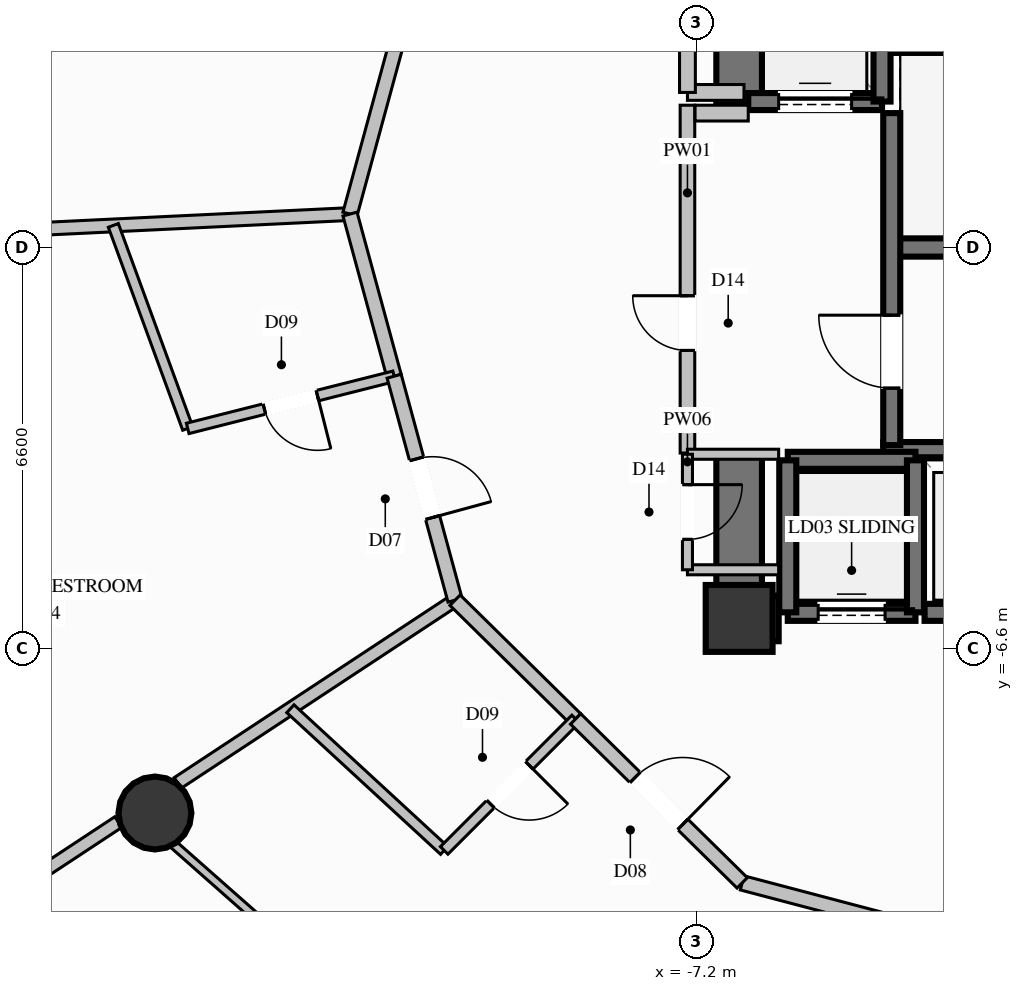
"""IFC4 building model, lengths in metres.
Left out: names, types, materials, properties, quantities, classifications, styles, units other than length and angle.
Written with IfcOpenShell. Run it as: python <this file> out.ifc"""

import sys

from ifc_helpers import new_model, si_unit, direction, frame, frame_2d, origin, origin_2d, place, context, subcontext, project, spatial, rectangle, circle, extrude, element, fill, save


model = new_model("IFC4")
c1 = context("Model", 3, precision=1e-05, world=origin(), true_north=direction((0.0, 1.0)))
c2 = subcontext(c1, "Body", "Model", "MODEL_VIEW")
j1 = project(units=[si_unit("LENGTHUNIT", "METRE"), si_unit("PLANEANGLEUNIT", "RADIAN")], contexts=[c1])
p1 = place(None, origin())
s1 = spatial("IfcSite", under=j1, at=p1, CompositionType="ELEMENT")
p2 = place(p1, origin())
s2 = spatial("IfcBuilding", under=s1, at=p2, CompositionType="ELEMENT")
p3 = place(p2, frame((0.0, 0.0, 89.6)))
s3 = spatial("IfcBuildingStorey", under=s2, at=p3, CompositionType="ELEMENT", Elevation=89.6)
p4 = place(p3, frame((-6.5, -6.1, 0.0), z_axis=(0.0, 0.0, 1.0), x_axis=(1.0, 0.0, 0.0)))
e1 = element("IfcColumn", 1, at=p4, inside=s3, PredefinedType="COLUMN", context=c2, shape_type="SweptSolid", body=[
    extrude(rectangle(XDim=1.1, YDim=1.1, at=origin_2d()), origin(), (0.0, 0.0, 1.0), 3.6),
])
p5 = place(p3, frame((-3.99, 0.0, 0.0), z_axis=(0.0, 0.0, 1.0), x_axis=(1.0, 0.0, 0.0)))
e2 = element("IfcWall", 2, at=p5, inside=s3, PredefinedType="SHEAR", context=c2, shape_type="SweptSolid", body=[
    extrude(rectangle(XDim=7.98, YDim=0.3, at=frame_2d((3.99, 0.0))), origin(), (0.0, 0.0, 1.0), 3.6),
])
for number, where, z_axis, x_axis in (
    (3, (-4.13, -3.325, 0.0), (0.0, 0.0, 1.0), (1.0, 0.0, 0.0)),
    (4, (-4.13, 3.325, 0.0), (0.0, 0.0, 1.0), (1.0, 0.0, 0.0)),
):
    element("IfcWall", number, at=place(p3, frame(where, z_axis=z_axis, x_axis=x_axis)), inside=s3, PredefinedType="SOLIDWALL", context=c2, shape_type="SweptSolid", body=[
        extrude(rectangle(XDim=8.26, YDim=0.25, at=frame_2d((4.13, 0.0))), origin(), (0.0, 0.0, 1.0), 3.6),
    ])
p6 = place(p3, frame((-6.125, -6.1, 0.0), z_axis=(0.0, 0.0, 1.0), x_axis=(1.0, 0.0, 0.0)))
e5 = element("IfcWall", 5, at=p6, inside=s3, PredefinedType="SHEAR", context=c2, shape_type="SweptSolid", body=[
    extrude(rectangle(XDim=0.275, YDim=0.75, at=frame_2d((0.137, 0.0))), origin(), (0.0, 0.0, 1.0), 3.6),
])
p7 = place(p3, frame((-6.5, 2.35, 0.0), z_axis=(0.0, 0.0, 1.0), x_axis=(0.0, 1.0, 0.0)))
e6 = element("IfcWall", 6, at=p7, inside=s3, PredefinedType="SHEAR", context=c2, shape_type="SweptSolid", body=[
    extrude(rectangle(XDim=4.125, YDim=0.75, at=frame_2d((2.062, 0.0))), origin(), (0.0, 0.0, 1.0), 3.6),
])
p8 = place(p3, frame((-6.5, -6.475, 0.0), z_axis=(0.0, 0.0, 1.0), x_axis=(0.0, 1.0, 0.0)))
e7 = element("IfcWall", 7, at=p8, inside=s3, PredefinedType="SHEAR", context=c2, shape_type="SweptSolid", body=[
    extrude(rectangle(XDim=3.125, YDim=0.75, at=frame_2d((1.562, 0.0))), origin(), (0.0, 0.0, 1.0), 3.6),
])
p9 = place(p3, frame((-16.108, -9.3, 0.0), z_axis=(0.0, 0.0, 1.0), x_axis=(1.0, 0.0, 0.0)))
e8 = element("IfcColumn", 8, at=p9, inside=s3, PredefinedType="COLUMN", context=c2, shape_type="SweptSolid", body=[
    extrude(circle(Radius=0.6, at=origin_2d()), origin(), (0.0, 0.0, 1.0), 3.6),
])
p10 = place(p3, frame((-15.415, -15.264, 0.0), z_axis=(0.0, 0.0, 1.0), x_axis=(-0.667278098427, 0.744808659563, 0.0)))
e9 = element("IfcWall", 9, at=p10, inside=s3, PredefinedType="SOLIDWALL", context=c2, shape_type="SweptSolid", body=[
    extrude(rectangle(XDim=8.149, YDim=0.32, at=frame_2d((4.075, 0.0))), origin(), (0.0, 0.0, 1.0), 3.2),
])
p11 = place(p10, frame((1.862, 0.0, 0.35)))
e10 = element("IfcOpeningElement", 10, at=p11, cuts=e9, PredefinedType="OPENING", context=c2, shape_type="SweptSolid", body=[
    extrude(rectangle(XDim=1.8, YDim=2.6, at=frame_2d((0.9, 1.3))), frame((0.0, 0.17, 0.0), z_axis=(0.0, -1.0, 0.0), x_axis=(1.0, 0.0, 0.0)), (0.0, 0.0, 1.0), 0.34),
])
p12 = place(p3, frame((-5.7, -6.0, 0.0), z_axis=(0.0, 0.0, 1.0), x_axis=(1.0, 0.0, 0.0)))
e11 = element("IfcWall", 11, at=p12, inside=s3, PredefinedType="SOLIDWALL", context=c2, shape_type="SweptSolid", body=[
    extrude(rectangle(XDim=2.1, YDim=0.28, at=frame_2d((1.05, 0.0))), origin(), (0.0, 0.0, 1.0), 3.2),
])
p13 = place(p12, frame((0.5, 0.0, 0.0)))
e12 = element("IfcOpeningElement", 12, at=p13, cuts=e11, PredefinedType="OPENING", context=c2, shape_type="SweptSolid", body=[
    extrude(rectangle(XDim=1.1, YDim=2.02, at=frame_2d((0.55, 1.01))), frame((0.0, 0.15, 0.0), z_axis=(0.0, -1.0, 0.0), x_axis=(1.0, 0.0, 0.0)), (0.0, 0.0, 1.0), 0.3),
])
p14 = place(p3, frame((-3.6, -3.5, 0.0), z_axis=(0.0, 0.0, 1.0), x_axis=(-1.0, 0.0, 0.0)))
e13 = element("IfcWall", 13, at=p14, inside=s3, PredefinedType="SOLIDWALL", context=c2, shape_type="SweptSolid", body=[
    extrude(rectangle(XDim=2.1, YDim=0.28, at=frame_2d((1.05, 0.0))), origin(), (0.0, 0.0, 1.0), 3.2),
])
for number, where, z_axis, x_axis in (
    (14, (-5.7, -3.5, 0.0), (0.0, 0.0, 1.0), (0.0, -1.0, 0.0)),
    (15, (-3.6, -6.0, 0.0), (0.0, 0.0, 1.0), (0.0, 1.0, 0.0)),
):
    element("IfcWall", number, at=place(p3, frame(where, z_axis=z_axis, x_axis=x_axis)), inside=s3, PredefinedType="SOLIDWALL", context=c2, shape_type="SweptSolid", body=[
        extrude(rectangle(XDim=2.5, YDim=0.28, at=frame_2d((1.25, 0.0))), origin(), (0.0, 0.0, 1.0), 3.2),
    ])
p15 = place(p3, frame((-3.45, -6.0, 0.0), z_axis=(0.0, 0.0, 1.0), x_axis=(1.0, 0.0, 0.0)))
e16 = element("IfcWall", 16, at=p15, inside=s3, PredefinedType="SOLIDWALL", context=c2, shape_type="SweptSolid", body=[
    extrude(rectangle(XDim=2.1, YDim=0.28, at=frame_2d((1.05, 0.0))), origin(), (0.0, 0.0, 1.0), 3.2),
])
p16 = place(p15, frame((0.5, 0.0, 0.0)))
e17 = element("IfcOpeningElement", 17, at=p16, cuts=e16, PredefinedType="OPENING", context=c2, shape_type="SweptSolid", body=[
    extrude(rectangle(XDim=1.1, YDim=2.02, at=frame_2d((0.55, 1.01))), frame((0.0, 0.15, 0.0), z_axis=(0.0, -1.0, 0.0), x_axis=(1.0, 0.0, 0.0)), (0.0, 0.0, 1.0), 0.3),
])
p17 = place(p3, frame((-6.35, 2.4, 0.0), z_axis=(0.0, 0.0, 1.0), x_axis=(1.0, 0.0, 0.0)))
e18 = element("IfcWall", 18, at=p17, inside=s3, PredefinedType="SOLIDWALL", context=c2, shape_type="SweptSolid", body=[
    extrude(rectangle(XDim=2.2, YDim=0.28, at=frame_2d((1.1, 0.0))), origin(), (0.0, 0.0, 1.0), 3.2),
])
p18 = place(p17, frame((0.5, 0.0, 0.0)))
e19 = element("IfcOpeningElement", 19, at=p18, cuts=e18, PredefinedType="OPENING", context=c2, shape_type="SweptSolid", body=[
    extrude(rectangle(XDim=1.2, YDim=2.2, at=frame_2d((0.6, 1.1))), frame((0.0, 0.15, 0.0), z_axis=(0.0, -1.0, 0.0), x_axis=(1.0, 0.0, 0.0)), (0.0, 0.0, 1.0), 0.3),
])
p19 = place(p3, frame((-4.15, 2.4, 0.0), z_axis=(0.0, 0.0, 1.0), x_axis=(0.0, 1.0, 0.0)))
e20 = element("IfcWall", 20, at=p19, inside=s3, PredefinedType="SOLIDWALL", context=c2, shape_type="SweptSolid", body=[
    extrude(rectangle(XDim=2.7, YDim=0.28, at=frame_2d((1.35, 0.0))), origin(), (0.0, 0.0, 1.0), 3.2),
])
p20 = place(p3, frame((-3.99, -3.25, 0.0), z_axis=(0.0, 0.0, 1.0), x_axis=(0.0, 1.0, 0.0)))
e21 = element("IfcWall", 21, at=p20, inside=s3, PredefinedType="SOLIDWALL", context=c2, shape_type="SweptSolid", body=[
    extrude(rectangle(XDim=5.46, YDim=0.28, at=frame_2d((2.73, 0.0))), origin(), (0.0, 0.0, 1.0), 3.2),
])
p21 = place(p20, frame((0.937, 0.0, 0.0)))
e22 = element("IfcOpeningElement", 22, at=p21, cuts=e21, PredefinedType="OPENING", context=c2, shape_type="SweptSolid", body=[
    extrude(rectangle(XDim=1.2, YDim=2.2, at=frame_2d((0.6, 1.1))), frame((0.0, 0.15, 0.0), z_axis=(0.0, -1.0, 0.0), x_axis=(1.0, 0.0, 0.0)), (0.0, 0.0, 1.0), 0.3),
])
p22 = place(p3, frame((-7.35, -3.38, 0.0), z_axis=(0.0, 0.0, 1.0), x_axis=(0.0, 1.0, 0.0)))
e23 = element("IfcWall", 23, at=p22, inside=s3, PredefinedType="PARTITIONING", context=c2, shape_type="SweptSolid", body=[
    extrude(rectangle(XDim=5.72, YDim=0.24, at=frame_2d((2.86, 0.0))), origin(), (0.0, 0.0, 1.0), 3.2),
])
p23 = place(p22, frame((1.687, 0.0, 0.0)))
e24 = element("IfcOpeningElement", 24, at=p23, cuts=e23, PredefinedType="OPENING", context=c2, shape_type="SweptSolid", body=[
    extrude(rectangle(XDim=0.9, YDim=2.02, at=frame_2d((0.45, 1.01))), frame((0.0, 0.13, 0.0), z_axis=(0.0, -1.0, 0.0), x_axis=(1.0, 0.0, 0.0)), (0.0, 0.0, 1.0), 0.26),
])
p24 = place(p3, frame((-7.225, 2.21, 0.0), z_axis=(0.0, 0.0, 1.0), x_axis=(1.0, 0.0, 0.0)))
e25 = element("IfcWall", 25, at=p24, inside=s3, PredefinedType="PARTITIONING", context=c2, shape_type="SweptSolid", body=[
    extrude(rectangle(XDim=0.875, YDim=0.26, at=frame_2d((0.438, 0.0))), origin(), (0.0, 0.0, 1.0), 3.2),
])
p25 = place(p3, frame((-7.35, 2.55, 0.0), z_axis=(0.0, 0.0, 1.0), x_axis=(1.0, 0.0, 0.0)))
e26 = element("IfcWall", 26, at=p25, inside=s3, PredefinedType="PARTITIONING", context=c2, shape_type="SweptSolid", body=[
    extrude(rectangle(XDim=0.93, YDim=0.26, at=frame_2d((0.465, 0.0))), origin(), (0.0, 0.0, 1.0), 3.2),
])
p26 = place(p3, frame((-7.35, 2.55, 0.0), z_axis=(0.0, 0.0, 1.0), x_axis=(0.0, 1.0, 0.0)))
e27 = element("IfcWall", 27, at=p26, inside=s3, PredefinedType="PARTITIONING", context=c2, shape_type="SweptSolid", body=[
    extrude(rectangle(XDim=2.4, YDim=0.26, at=frame_2d((1.2, 0.0))), origin(), (0.0, 0.0, 1.0), 3.2),
])
p27 = place(p26, frame((0.75, 0.0, 0.0)))
e28 = element("IfcOpeningElement", 28, at=p27, cuts=e27, PredefinedType="OPENING", context=c2, shape_type="SweptSolid", body=[
    extrude(rectangle(XDim=0.9, YDim=2.02, at=frame_2d((0.45, 1.01))), frame((0.0, 0.14, 0.0), z_axis=(0.0, -1.0, 0.0), x_axis=(1.0, 0.0, 0.0)), (0.0, 0.0, 1.0), 0.28),
])
for number, where, z_axis, x_axis in (
    (29, (-7.35, -5.3, 0.0), (0.0, 0.0, 1.0), (1.0, 0.0, 0.0)),
    (30, (-5.85, -3.4, 0.0), (0.0, 0.0, 1.0), (-1.0, 0.0, 0.0)),
):
    element("IfcWall", number, at=place(p3, frame(where, z_axis=z_axis, x_axis=x_axis)), inside=s3, PredefinedType="PARTITIONING", context=c2, shape_type="SweptSolid", body=[
        extrude(rectangle(XDim=1.5, YDim=0.165, at=frame_2d((0.75, 0.0))), origin(), (0.0, 0.0, 1.0), 3.2),
    ])
p28 = place(p3, frame((-7.35, -3.4, 0.0), z_axis=(0.0, 0.0, 1.0), x_axis=(0.0, -1.0, 0.0)))
e31 = element("IfcWall", 31, at=p28, inside=s3, PredefinedType="PARTITIONING", context=c2, shape_type="SweptSolid", body=[
    extrude(rectangle(XDim=1.9, YDim=0.165, at=frame_2d((0.95, 0.0))), origin(), (0.0, 0.0, 1.0), 3.2),
])
p29 = place(p28, frame((0.5, 0.0, 0.0)))
e32 = element("IfcOpeningElement", 32, at=p29, cuts=e31, PredefinedType="OPENING", context=c2, shape_type="SweptSolid", body=[
    extrude(rectangle(XDim=0.9, YDim=2.02, at=frame_2d((0.45, 1.01))), frame((0.0, 0.093, 0.0), z_axis=(0.0, -1.0, 0.0), x_axis=(1.0, 0.0, 0.0)), (0.0, 0.0, 1.0), 0.185),
])
p30 = place(p3, frame((-12.9, 0.55, 0.0), z_axis=(0.0, 0.0, 1.0), x_axis=(-0.998846217128, -0.048023270708, 0.0)))
e33 = element("IfcWall", 33, at=p30, inside=s3, PredefinedType="PARTITIONING", context=c2, shape_type="SweptSolid", body=[
    extrude(rectangle(XDim=5.165, YDim=0.21, at=frame_2d((2.583, 0.0))), origin(), (0.0, 0.0, 1.0), 2.067),
])
p31 = place(p3, frame((-11.172, -5.8, 0.0), z_axis=(0.0, 0.0, 1.0), x_axis=(-0.835022135292, -0.550216351604, 0.0)))
e34 = element("IfcWall", 34, at=p31, inside=s3, PredefinedType="PARTITIONING", context=c2, shape_type="SweptSolid", body=[
    extrude(rectangle(XDim=5.463, YDim=0.21, at=frame_2d((2.731, 0.0))), origin(), (0.0, 0.0, 1.0), 2.067),
])
p32 = place(p3, frame((-16.71, -9.449, 0.0), z_axis=(0.0, 0.0, 1.0), x_axis=(-0.834983630618, -0.550274782813, 0.0)))
e35 = element("IfcWall", 35, at=p32, inside=s3, PredefinedType="PARTITIONING", context=c2, shape_type="SweptSolid", body=[
    extrude(rectangle(XDim=2.908, YDim=0.21, at=frame_2d((1.454, 0.0))), origin(), (0.0, 0.0, 1.0), 3.2),
])
p33 = place(p3, frame((-11.172, 6.9, 0.0), z_axis=(0.0, 0.0, 1.0), x_axis=(-0.262552308576, -0.96491776088, 0.0)))
e36 = element("IfcWall", 36, at=p33, inside=s3, PredefinedType="PARTITIONING", context=c2, shape_type="SweptSolid", body=[
    extrude(rectangle(XDim=6.581, YDim=0.24, at=frame_2d((3.291, 0.0))), origin(), (0.0, 0.0, 1.0), 3.2),
])
p34 = place(p3, frame((-12.9, 0.55, 0.0), z_axis=(0.0, 0.0, 1.0), x_axis=(0.262601663623, -0.964904330109, 0.0)))
e37 = element("IfcWall", 37, at=p34, inside=s3, PredefinedType="PARTITIONING", context=c2, shape_type="SweptSolid", body=[
    extrude(rectangle(XDim=2.764, YDim=0.24, at=frame_2d((1.382, 0.0))), origin(), (0.0, 0.0, 1.0), 3.2),
])
p35 = place(p3, frame((-16.792, 0.363, 0.0), z_axis=(0.0, 0.0, 1.0), x_axis=(0.343986263083, -0.938974680601, 0.0)))
e38 = element("IfcWall", 38, at=p35, inside=s3, PredefinedType="PLUMBINGWALL", context=c2, shape_type="SweptSolid", body=[
    extrude(rectangle(XDim=3.555, YDim=0.175, at=frame_2d((1.778, 0.0))), origin(), (0.0, 0.0, 1.0), 3.2),
])
p36 = place(p3, frame((-12.174, -2.117, 0.0), z_axis=(0.0, 0.0, 1.0), x_axis=(-0.969507641887, -0.24506107876, 0.0)))
e39 = element("IfcWall", 39, at=p36, inside=s3, PredefinedType="PLUMBINGWALL", context=c2, shape_type="SweptSolid", body=[
    extrude(rectangle(XDim=3.502, YDim=0.175, at=frame_2d((1.751, 0.0))), origin(), (0.0, 0.0, 1.0), 3.2),
])
p37 = place(p36, frame((1.301, 0.0, 0.0)))
e40 = element("IfcOpeningElement", 40, at=p37, cuts=e39, PredefinedType="OPENING", context=c2, shape_type="SweptSolid", body=[
    extrude(rectangle(XDim=0.9, YDim=2.1, at=frame_2d((0.45, 1.05))), frame((0.0, 0.098, 0.0), z_axis=(0.0, -1.0, 0.0), x_axis=(1.0, 0.0, 0.0)), (0.0, 0.0, 1.0), 0.195),
])
p38 = place(p3, frame((-12.174, -2.117, 0.0), z_axis=(0.0, 0.0, 1.0), x_axis=(0.262500363951, -0.964931893413, 0.0)))
e41 = element("IfcWall", 41, at=p38, inside=s3, PredefinedType="PARTITIONING", context=c2, shape_type="SweptSolid", body=[
    extrude(rectangle(XDim=3.817, YDim=0.24, at=frame_2d((1.908, 0.0))), origin(), (0.0, 0.0, 1.0), 3.2),
])
p39 = place(p38, frame((1.408, 0.0, 0.0)))
e42 = element("IfcOpeningElement", 42, at=p39, cuts=e41, PredefinedType="OPENING", context=c2, shape_type="SweptSolid", body=[
    extrude(rectangle(XDim=1.0, YDim=2.2, at=frame_2d((0.5, 1.1))), frame((0.0, 0.13, 0.0), z_axis=(0.0, -1.0, 0.0), x_axis=(1.0, 0.0, 0.0)), (0.0, 0.0, 1.0), 0.26),
])
p40 = place(p3, frame((-11.172, -5.8, 0.0), z_axis=(0.0, 0.0, 1.0), x_axis=(0.712524314294, -0.701647419677, 0.0)))
e43 = element("IfcWall", 43, at=p40, inside=s3, PredefinedType="PARTITIONING", context=c2, shape_type="SweptSolid", body=[
    extrude(rectangle(XDim=2.783, YDim=0.24, at=frame_2d((1.392, 0.0))), origin(), (0.0, 0.0, 1.0), 3.2),
])
p41 = place(p3, frame((-13.88, -7.585, 0.0), z_axis=(0.0, 0.0, 1.0), x_axis=(0.735412881507, -0.677619283752, 0.0)))
e44 = element("IfcWall", 44, at=p41, inside=s3, PredefinedType="PLUMBINGWALL", context=c2, shape_type="SweptSolid", body=[
    extrude(rectangle(XDim=3.439, YDim=0.175, at=frame_2d((1.719, 0.0))), origin(), (0.0, 0.0, 1.0), 3.2),
])
p42 = place(p3, frame((-9.189, -7.753, 0.0), z_axis=(0.0, 0.0, 1.0), x_axis=(-0.707106781187, -0.707106781187, 0.0)))
e45 = element("IfcWall", 45, at=p42, inside=s3, PredefinedType="PLUMBINGWALL", context=c2, shape_type="SweptSolid", body=[
    extrude(rectangle(XDim=3.058, YDim=0.175, at=frame_2d((1.529, 0.0))), origin(), (0.0, 0.0, 1.0), 3.2),
])
p43 = place(p42, frame((1.079, 0.0, 0.0)))
e46 = element("IfcOpeningElement", 46, at=p43, cuts=e45, PredefinedType="OPENING", context=c2, shape_type="SweptSolid", body=[
    extrude(rectangle(XDim=0.9, YDim=2.1, at=frame_2d((0.45, 1.05))), frame((0.0, 0.098, 0.0), z_axis=(0.0, -1.0, 0.0), x_axis=(1.0, 0.0, 0.0)), (0.0, 0.0, 1.0), 0.195),
])
p44 = place(p3, frame((-6.45, -10.449, 0.0), z_axis=(0.0, 0.0, 1.0), x_axis=(0.966942608664, -0.254994101009, 0.0)))
e47 = element("IfcWall", 47, at=p44, inside=s3, PredefinedType="PARTITIONING", context=c2, shape_type="SweptSolid", body=[
    extrude(rectangle(XDim=6.67, YDim=0.24, at=frame_2d((3.335, 0.0))), origin(), (0.0, 0.0, 1.0), 3.2),
])
p45 = place(p3, frame((-9.189, -7.753, 0.0), z_axis=(0.0, 0.0, 1.0), x_axis=(0.712674788685, -0.70149457986, 0.0)))
e48 = element("IfcWall", 48, at=p45, inside=s3, PredefinedType="PARTITIONING", context=c2, shape_type="SweptSolid", body=[
    extrude(rectangle(XDim=3.843, YDim=0.24, at=frame_2d((1.922, 0.0))), origin(), (0.0, 0.0, 1.0), 3.2),
])
p46 = place(p45, frame((1.372, 0.0, 0.0)))
e49 = element("IfcOpeningElement", 49, at=p46, cuts=e48, PredefinedType="OPENING", context=c2, shape_type="SweptSolid", body=[
    extrude(rectangle(XDim=1.1, YDim=2.3, at=frame_2d((0.55, 1.15))), frame((0.0, 0.13, 0.0), z_axis=(0.0, -1.0, 0.0), x_axis=(1.0, 0.0, 0.0)), (0.0, 0.0, 1.0), 0.26),
])
p47 = place(p3, frame((-16.43, -9.264, 0.0), z_axis=(0.0, 0.0, 1.0), x_axis=(0.749748657473, -0.661722714297, 0.0)))
e50 = element("IfcWall", 50, at=p47, inside=s3, PredefinedType="PARTITIONING", context=c2, shape_type="SweptSolid", body=[
    extrude(rectangle(XDim=9.666, YDim=0.135, at=frame_2d((4.833, 0.0))), origin(), (0.0, 0.0, 1.0), 2.653),
])
p48 = place(p47, frame((4.358, 0.0, 0.0)))
e51 = element("IfcOpeningElement", 51, at=p48, cuts=e50, PredefinedType="OPENING", context=c2, shape_type="SweptSolid", body=[
    extrude(rectangle(XDim=0.95, YDim=2.1, at=frame_2d((0.475, 1.05))), frame((0.0, 0.078, 0.0), z_axis=(0.0, -1.0, 0.0), x_axis=(1.0, 0.0, 0.0)), (0.0, 0.0, 1.0), 0.155),
])
p49 = place(p13, origin())
e52 = element("IfcDoor", 52, at=p49, inside=s3, OperationType="SLIDING_TO_LEFT", PredefinedType="DOOR", context=c2, shape_type="SweptSolid", body=[
    extrude(rectangle(XDim=1.1, YDim=2.02, at=frame_2d((0.55, 1.01))), frame((0.0, 0.025, 0.0), z_axis=(0.0, -1.0, 0.0), x_axis=(1.0, 0.0, 0.0)), (0.0, 0.0, 1.0), 0.05),
])
fill(e12, e52)
p50 = place(p18, origin())
e53 = element("IfcDoor", 53, at=p50, inside=s3, OperationType="SLIDING_TO_LEFT", PredefinedType="DOOR", context=c2, shape_type="SweptSolid", body=[
    extrude(rectangle(XDim=1.2, YDim=2.2, at=frame_2d((0.6, 1.1))), frame((0.0, 0.025, 0.0), z_axis=(0.0, -1.0, 0.0), x_axis=(1.0, 0.0, 0.0)), (0.0, 0.0, 1.0), 0.05),
])
fill(e19, e53)
p51 = place(p21, origin())
e54 = element("IfcDoor", 54, at=p51, inside=s3, OperationType="SINGLE_SWING_RIGHT", PredefinedType="DOOR", context=c2, shape_type="SweptSolid", body=[
    extrude(rectangle(XDim=1.2, YDim=2.2, at=frame_2d((0.6, 1.1))), frame((0.0, 0.025, 0.0), z_axis=(0.0, -1.0, 0.0), x_axis=(1.0, 0.0, 0.0)), (0.0, 0.0, 1.0), 0.05),
])
fill(e22, e54)
p52 = place(p23, origin())
e55 = element("IfcDoor", 55, at=p52, inside=s3, OperationType="SINGLE_SWING_RIGHT", PredefinedType="DOOR", context=c2, shape_type="SweptSolid", body=[
    extrude(rectangle(XDim=0.9, YDim=2.02, at=frame_2d((0.45, 1.01))), frame((0.0, 0.025, 0.0), z_axis=(0.0, -1.0, 0.0), x_axis=(1.0, 0.0, 0.0)), (0.0, 0.0, 1.0), 0.05),
])
fill(e24, e55)
p53 = place(p29, origin())
e56 = element("IfcDoor", 56, at=p53, inside=s3, OperationType="SINGLE_SWING_LEFT", PredefinedType="DOOR", context=c2, shape_type="SweptSolid", body=[
    extrude(rectangle(XDim=0.9, YDim=2.02, at=frame_2d((0.45, 1.01))), frame((0.0, 0.025, 0.0), z_axis=(0.0, -1.0, 0.0), x_axis=(1.0, 0.0, 0.0)), (0.0, 0.0, 1.0), 0.05),
])
fill(e32, e56)
p54 = place(p37, origin())
e57 = element("IfcDoor", 57, at=p54, inside=s3, OperationType="SINGLE_SWING_LEFT", PredefinedType="DOOR", context=c2, shape_type="SweptSolid", body=[
    extrude(rectangle(XDim=0.9, YDim=2.1, at=frame_2d((0.45, 1.05))), frame((0.0, 0.025, 0.0), z_axis=(0.0, -1.0, 0.0), x_axis=(1.0, 0.0, 0.0)), (0.0, 0.0, 1.0), 0.05),
])
fill(e40, e57)
p55 = place(p39, origin())
e58 = element("IfcDoor", 58, at=p55, inside=s3, OperationType="SINGLE_SWING_RIGHT", PredefinedType="DOOR", context=c2, shape_type="SweptSolid", body=[
    extrude(rectangle(XDim=1.0, YDim=2.2, at=frame_2d((0.5, 1.1))), frame((0.0, 0.025, 0.0), z_axis=(0.0, -1.0, 0.0), x_axis=(1.0, 0.0, 0.0)), (0.0, 0.0, 1.0), 0.05),
])
fill(e42, e58)
p56 = place(p43, origin())
e59 = element("IfcDoor", 59, at=p56, inside=s3, OperationType="SINGLE_SWING_LEFT", PredefinedType="DOOR", context=c2, shape_type="SweptSolid", body=[
    extrude(rectangle(XDim=0.9, YDim=2.1, at=frame_2d((0.45, 1.05))), frame((0.0, 0.025, 0.0), z_axis=(0.0, -1.0, 0.0), x_axis=(1.0, 0.0, 0.0)), (0.0, 0.0, 1.0), 0.05),
])
fill(e46, e59)
p57 = place(p46, origin())
e60 = element("IfcDoor", 60, at=p57, inside=s3, OperationType="SINGLE_SWING_RIGHT", PredefinedType="DOOR", context=c2, shape_type="SweptSolid", body=[
    extrude(rectangle(XDim=1.1, YDim=2.3, at=frame_2d((0.55, 1.15))), frame((0.0, 0.025, 0.0), z_axis=(0.0, -1.0, 0.0), x_axis=(1.0, 0.0, 0.0)), (0.0, 0.0, 1.0), 0.05),
])
fill(e49, e60)
save(model, sys.argv[1])
